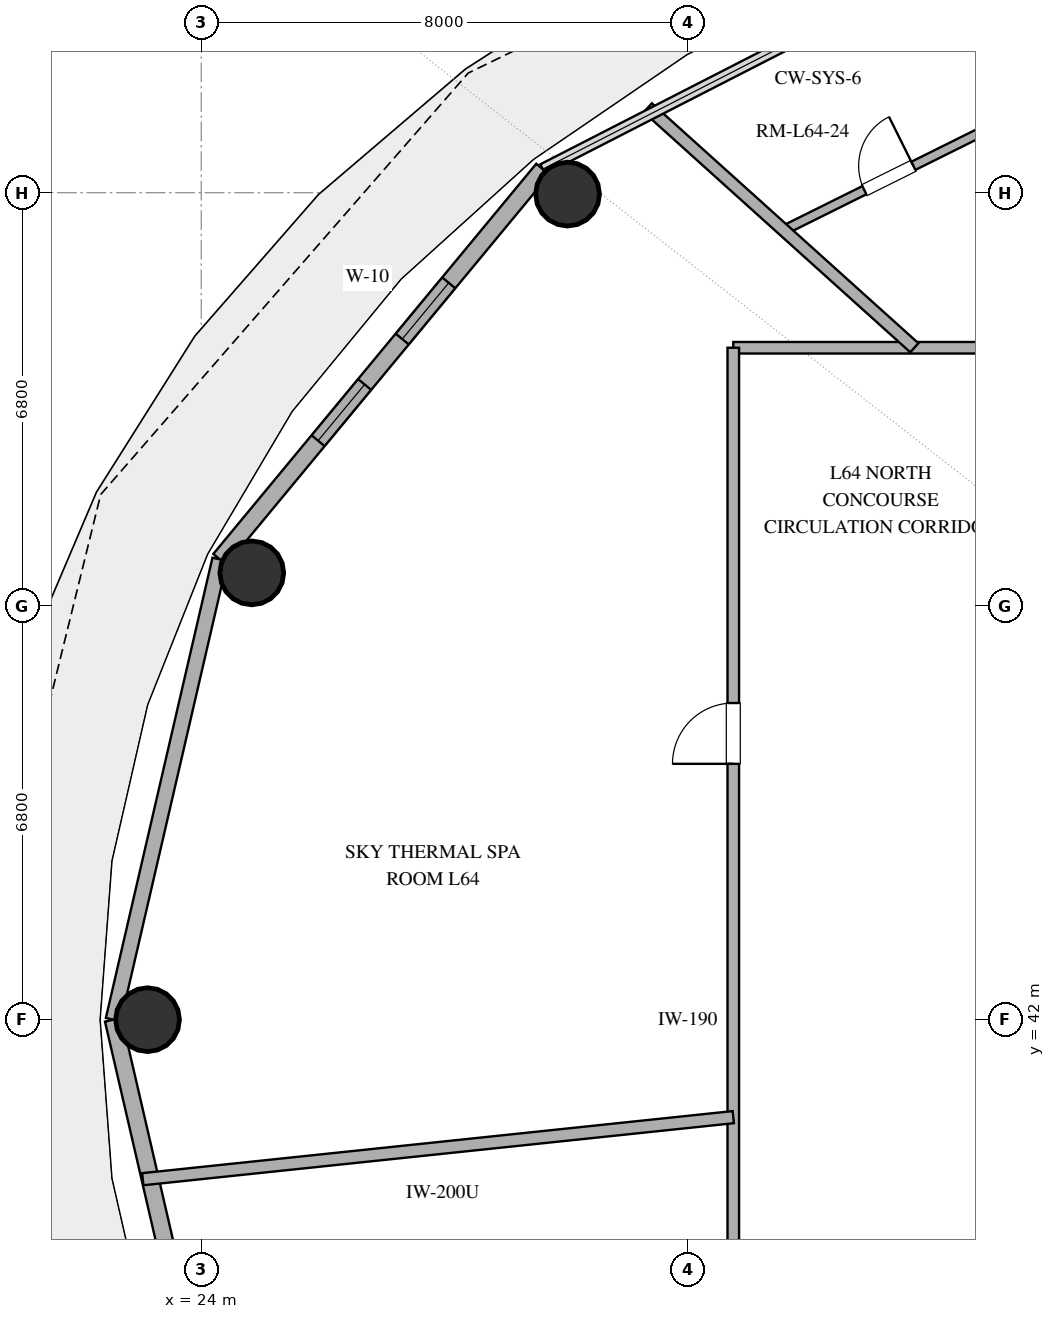
"""IFC4 building model, lengths in metres.
Left out: names, types, materials, properties, quantities, classifications, styles, units other than length and angle.
Written with IfcOpenShell. Run it as: python <this file> out.ifc"""

import sys

from ifc_helpers import new_model, si_unit, direction, frame, frame_2d, origin, origin_2d, place, context, subcontext, project, spatial, rectangle, hollow_circle, extrude, element, fill, save


model = new_model("IFC4")
c1 = context("Model", 3, precision=1e-05, world=origin(), true_north=direction((0.0, 1.0)))
c2 = subcontext(c1, "Body", "Model", "MODEL_VIEW")
j1 = project(units=[si_unit("LENGTHUNIT", "METRE"), si_unit("PLANEANGLEUNIT", "RADIAN")], contexts=[c1])
p1 = place(None, origin())
s1 = spatial("IfcSite", under=j1, at=p1, CompositionType="ELEMENT")
p2 = place(p1, origin())
s2 = spatial("IfcBuilding", under=s1, at=p2, CompositionType="ELEMENT")
p3 = place(p2, frame((0.0, 0.0, 249.6)))
s3 = spatial("IfcBuildingStorey", under=s2, at=p3, CompositionType="ELEMENT", Elevation=249.6)
for number, where, z_axis, x_axis in (
    (1, (30.025, 55.576, 0.0), (0.0, 0.0, 1.0), (1.0, 0.0, 0.0)),
    (2, (24.831, 49.347, 0.0), (0.0, 0.0, 1.0), (1.0, 0.0, 0.0)),
    (3, (23.117, 42.0, 0.0), (0.0, 0.0, 1.0), (1.0, 0.0, 0.0)),
):
    element("IfcColumn", number, at=place(p3, frame(where, z_axis=z_axis, x_axis=x_axis)), inside=s3, PredefinedType="COLUMN", context=c2, shape_type="SweptSolid", body=[
        extrude(hollow_circle(Radius=0.525, WallThickness=0.028, at=origin_2d()), origin(), (0.0, 0.0, 1.0), 3.36),
    ])
p4 = place(p3, frame((29.617, 55.987, 0.0), z_axis=(0.0, 0.0, 1.0), x_axis=(-0.63761509934, -0.770355103243, 0.0)))
e4 = element("IfcWall", 4, at=p4, inside=s3, PredefinedType="SOLIDWALL", context=c2, shape_type="SweptSolid", body=[
    extrude(rectangle(XDim=8.33, YDim=0.28, at=frame_2d((4.165, 0.0))), origin(), (0.0, 0.0, 1.0), 3.36),
])
p5 = place(p4, frame((2.426, 0.0, 0.85)))
e5 = element("IfcOpeningElement", 5, at=p5, cuts=e4, PredefinedType="OPENING", context=c2, shape_type="SweptSolid", body=[
    extrude(rectangle(XDim=1.2, YDim=1.6, at=frame_2d((0.6, 0.8))), frame((0.0, 0.15, 0.0), z_axis=(0.0, -1.0, 0.0), x_axis=(1.0, 0.0, 0.0)), (0.0, 0.0, 1.0), 0.3),
])
p6 = place(p4, frame((4.596, 0.0, 0.85)))
e6 = element("IfcOpeningElement", 6, at=p6, cuts=e4, PredefinedType="OPENING", context=c2, shape_type="SweptSolid", body=[
    extrude(rectangle(XDim=1.2, YDim=1.6, at=frame_2d((0.6, 0.8))), frame((0.0, 0.15, 0.0), z_axis=(0.0, -1.0, 0.0), x_axis=(1.0, 0.0, 0.0)), (0.0, 0.0, 1.0), 0.3),
])
p7 = place(p3, frame((24.306, 49.57, 0.0), z_axis=(0.0, 0.0, 1.0), x_axis=(-0.225635078214, -0.974211892495, 0.0)))
e7 = element("IfcWall", 7, at=p7, inside=s3, PredefinedType="SOLIDWALL", context=c2, shape_type="SweptSolid", body=[
    extrude(rectangle(XDim=7.77, YDim=0.25, at=frame_2d((3.885, 0.0))), origin(), (0.0, 0.0, 1.0), 3.36),
])
p8 = place(p3, frame((22.553, 42.0, 0.0), z_axis=(0.0, 0.0, 1.0), x_axis=(0.225635078214, -0.974211892495, 0.0)))
e8 = element("IfcWall", 8, at=p8, inside=s3, PredefinedType="SOLIDWALL", context=c2, shape_type="SweptSolid", body=[
    extrude(rectangle(XDim=7.77, YDim=0.28, at=frame_2d((3.885, 0.0))), origin(), (0.0, 0.0, 1.0), 3.36),
])
p9 = place(p8, frame((5.142, 0.0, 0.0)))
e9 = element("IfcOpeningElement", 9, at=p9, cuts=e8, PredefinedType="OPENING", context=c2, shape_type="SweptSolid", body=[
    extrude(rectangle(XDim=1.1, YDim=2.25, at=frame_2d((0.55, 1.125))), frame((0.0, 0.15, 0.0), z_axis=(0.0, -1.0, 0.0), x_axis=(1.0, 0.0, 0.0)), (0.0, 0.0, 1.0), 0.3),
])
p10 = place(p3, frame((32.75, 53.05, 0.0), z_axis=(0.0, 0.0, 1.0), x_axis=(1.0, 0.0, 0.0)))
e10 = element("IfcWall", 10, at=p10, inside=s3, PredefinedType="PARTITIONING", context=c2, shape_type="SweptSolid", body=[
    extrude(rectangle(XDim=19.527, YDim=0.19, at=frame_2d((9.763, 0.0))), origin(), (0.0, 0.0, 1.0), 2.72),
])
p11 = place(p10, frame((8.886, 0.0, 0.0)))
e11 = element("IfcOpeningElement", 11, at=p11, cuts=e10, PredefinedType="OPENING", context=c2, shape_type="SweptSolid", body=[
    extrude(rectangle(XDim=1.0, YDim=2.2, at=frame_2d((0.5, 1.1))), frame((0.0, 0.105, 0.0), z_axis=(0.0, -1.0, 0.0), x_axis=(1.0, 0.0, 0.0)), (0.0, 0.0, 1.0), 0.21),
])
p12 = place(p3, frame((32.75, 30.95, 0.0), z_axis=(0.0, 0.0, 1.0), x_axis=(0.0, 1.0, 0.0)))
e12 = element("IfcWall", 12, at=p12, inside=s3, PredefinedType="PARTITIONING", context=c2, shape_type="SweptSolid", body=[
    extrude(rectangle(XDim=22.1, YDim=0.19, at=frame_2d((11.05, 0.0))), origin(), (0.0, 0.0, 1.0), 2.72),
])
p13 = place(p12, frame((15.258, 0.0, 0.0)))
e13 = element("IfcOpeningElement", 13, at=p13, cuts=e12, PredefinedType="OPENING", context=c2, shape_type="SweptSolid", body=[
    extrude(rectangle(XDim=1.0, YDim=2.2, at=frame_2d((0.5, 1.1))), frame((0.0, 0.105, 0.0), z_axis=(0.0, -1.0, 0.0), x_axis=(1.0, 0.0, 0.0)), (0.0, 0.0, 1.0), 0.21),
])
p14 = place(p12, frame((4.24, 0.0, 0.0)))
e14 = element("IfcOpeningElement", 14, at=p14, cuts=e12, PredefinedType="OPENING", context=c2, shape_type="SweptSolid", body=[
    extrude(rectangle(XDim=1.0, YDim=2.2, at=frame_2d((0.5, 1.1))), frame((0.0, 0.105, 0.0), z_axis=(0.0, -1.0, 0.0), x_axis=(1.0, 0.0, 0.0)), (0.0, 0.0, 1.0), 0.21),
])
p15 = place(p3, frame((32.75, 40.397, 0.0), z_axis=(0.0, 0.0, 1.0), x_axis=(-0.994521469813, -0.104532512074, 0.0)))
e15 = element("IfcWall", 15, at=p15, inside=s3, PredefinedType="PARTITIONING", context=c2, shape_type="SweptSolid", body=[
    extrude(rectangle(XDim=9.765, YDim=0.2, at=frame_2d((4.882, 0.0))), origin(), (0.0, 0.0, 1.0), 2.72),
])
p16 = place(p3, frame((33.581, 54.983, 0.0), z_axis=(0.0, 0.0, 1.0), x_axis=(0.895475171501, 0.445111466069, 0.0)))
e16 = element("IfcWall", 16, at=p16, inside=s3, PredefinedType="PARTITIONING", context=c2, shape_type="SweptSolid", body=[
    extrude(rectangle(XDim=3.858, YDim=0.15, at=frame_2d((1.929, 0.0))), origin(), (0.0, 0.0, 1.0), 2.72),
])
p17 = place(p16, frame((1.479, 0.0, 0.0)))
e17 = element("IfcOpeningElement", 17, at=p17, cuts=e16, PredefinedType="OPENING", context=c2, shape_type="SweptSolid", body=[
    extrude(rectangle(XDim=0.9, YDim=2.1, at=frame_2d((0.45, 1.05))), frame((0.0, 0.085, 0.0), z_axis=(0.0, -1.0, 0.0), x_axis=(1.0, 0.0, 0.0)), (0.0, 0.0, 1.0), 0.17),
])
p18 = place(p3, frame((38.315, 56.806, 0.0), z_axis=(0.0, 0.0, 1.0), x_axis=(-0.547432597428, 0.8368497782, 0.0)))
e18 = element("IfcWall", 18, at=p18, inside=s3, PredefinedType="PARTITIONING", context=c2, shape_type="SweptSolid", body=[
    extrude(rectangle(XDim=3.374, YDim=0.15, at=frame_2d((1.687, 0.0))), origin(), (0.0, 0.0, 1.0), 2.72),
])
p19 = place(p3, frame((31.344, 56.997, 0.0), z_axis=(0.0, 0.0, 1.0), x_axis=(0.743158305959, -0.669115634464, 0.0)))
e19 = element("IfcWall", 19, at=p19, inside=s3, PredefinedType="PARTITIONING", context=c2, shape_type="SweptSolid", body=[
    extrude(rectangle(XDim=5.899, YDim=0.2, at=frame_2d((2.949, 0.0))), origin(), (0.0, 0.0, 1.0), 2.72),
])
p20 = place(p5, origin())
e20 = element("IfcWindow", 20, at=p20, inside=s3, PartitioningType="SINGLE_PANEL", PredefinedType="WINDOW", context=c2, shape_type="SweptSolid", body=[
    extrude(rectangle(XDim=1.2, YDim=1.6, at=frame_2d((0.6, 0.8))), frame((0.0, 0.03, 0.0), z_axis=(0.0, -1.0, 0.0), x_axis=(1.0, 0.0, 0.0)), (0.0, 0.0, 1.0), 0.06),
])
fill(e5, e20)
p21 = place(p6, origin())
e21 = element("IfcWindow", 21, at=p21, inside=s3, PartitioningType="SINGLE_PANEL", PredefinedType="WINDOW", context=c2, shape_type="SweptSolid", body=[
    extrude(rectangle(XDim=1.2, YDim=1.6, at=frame_2d((0.6, 0.8))), frame((0.0, 0.03, 0.0), z_axis=(0.0, -1.0, 0.0), x_axis=(1.0, 0.0, 0.0)), (0.0, 0.0, 1.0), 0.06),
])
fill(e6, e21)
p22 = place(p13, origin())
e22 = element("IfcDoor", 22, at=p22, inside=s3, OperationType="SINGLE_SWING_LEFT", PredefinedType="DOOR", context=c2, shape_type="SweptSolid", body=[
    extrude(rectangle(XDim=1.0, YDim=2.2, at=frame_2d((0.5, 1.1))), frame((0.0, 0.025, 0.0), z_axis=(0.0, -1.0, 0.0), x_axis=(1.0, 0.0, 0.0)), (0.0, 0.0, 1.0), 0.05),
])
fill(e13, e22)
p23 = place(p17, origin())
e23 = element("IfcDoor", 23, at=p23, inside=s3, OperationType="SINGLE_SWING_RIGHT", PredefinedType="DOOR", context=c2, shape_type="SweptSolid", body=[
    extrude(rectangle(XDim=0.9, YDim=2.1, at=frame_2d((0.45, 1.05))), frame((0.0, 0.025, 0.0), z_axis=(0.0, -1.0, 0.0), x_axis=(1.0, 0.0, 0.0)), (0.0, 0.0, 1.0), 0.05),
])
fill(e17, e23)
save(model, sys.argv[1])
